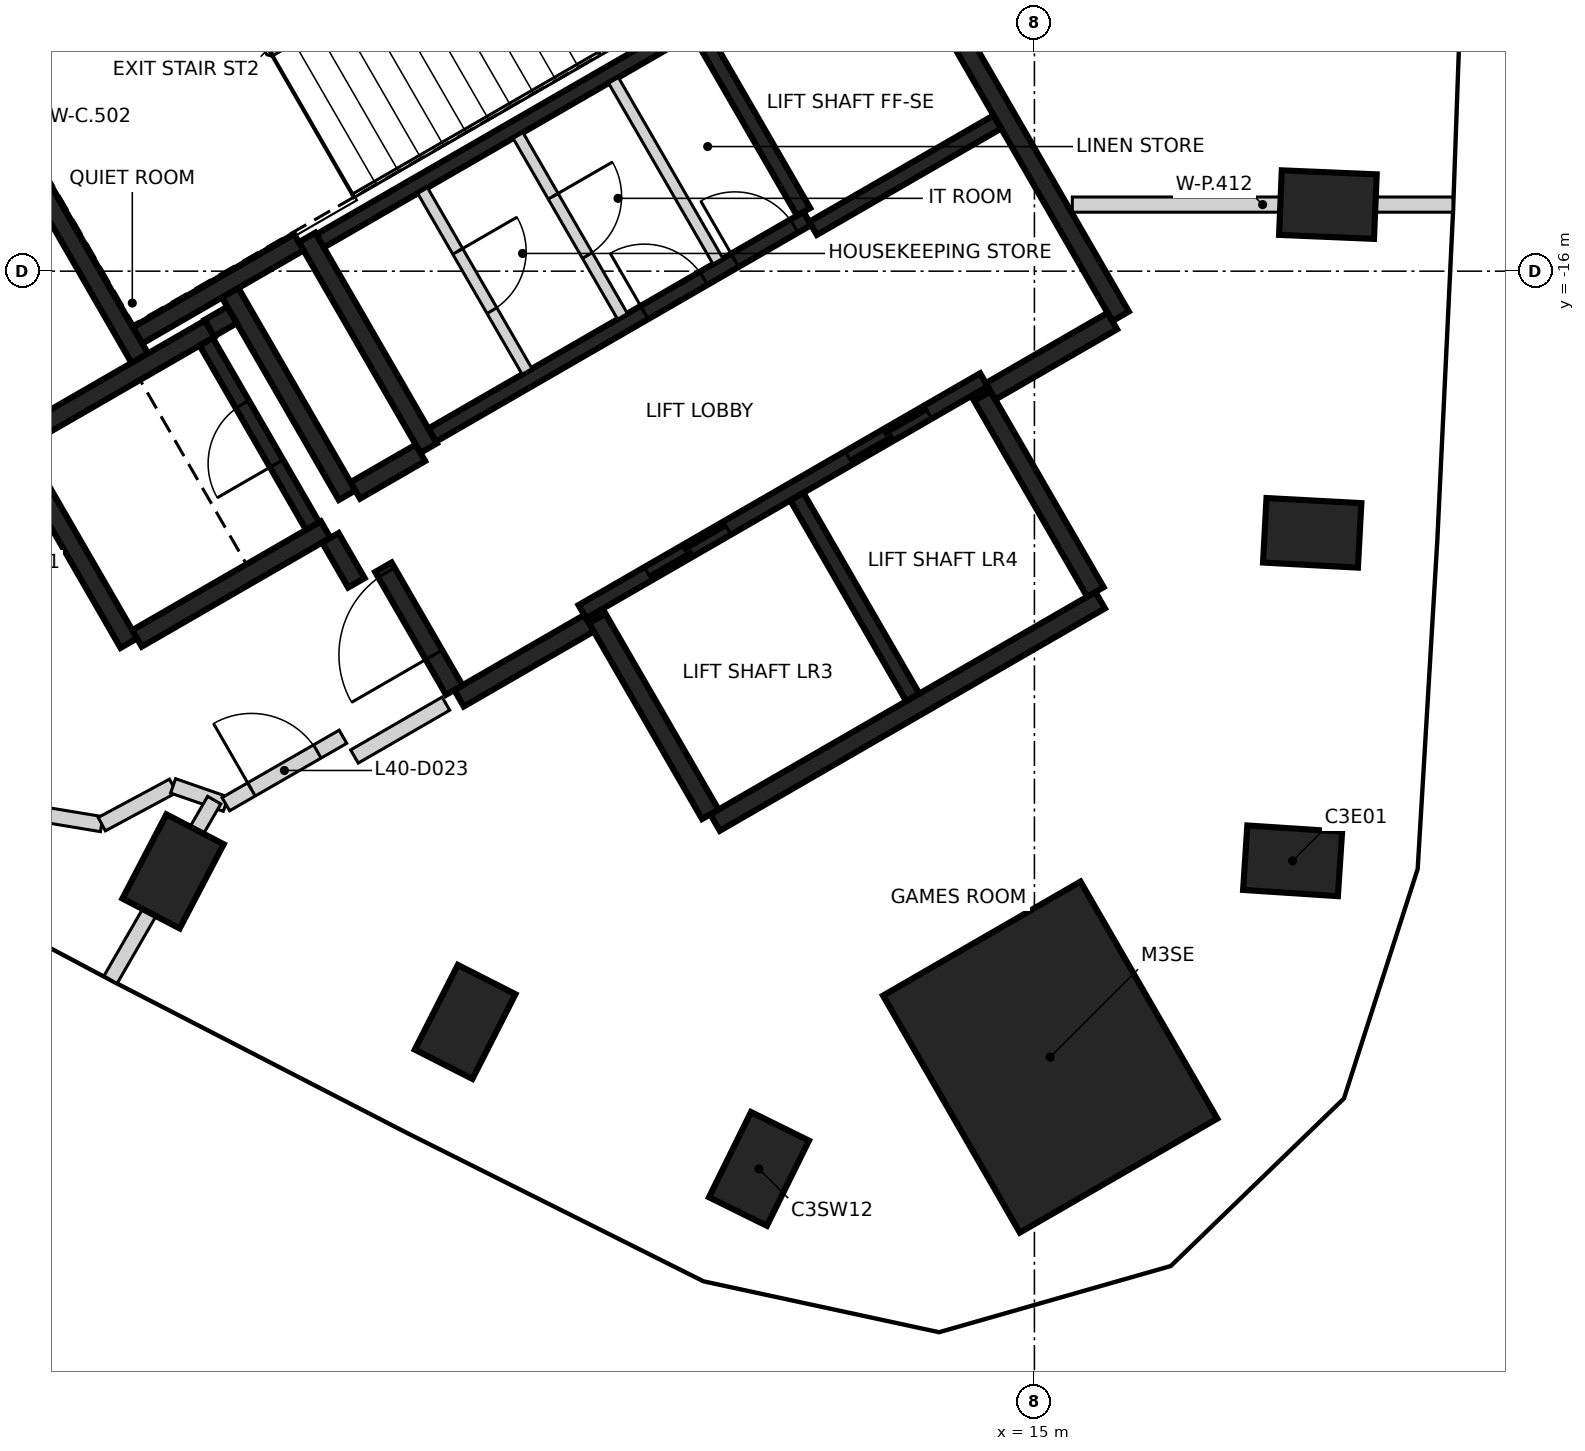
"""IFC4 building model, lengths in metres.
Left out: names, types, materials, properties, quantities, classifications, styles, units other than length and angle.
Written with IfcOpenShell. Run it as: python <this file> out.ifc"""

import sys

from ifc_helpers import new_model, si_unit, direction, frame, frame_2d, origin, origin_2d, place, context, subcontext, project, spatial, rectangle, extrude, element, fill, save


model = new_model("IFC4")
c1 = context("Model", 3, precision=1e-05, world=origin(), true_north=direction((0.0, 1.0)))
c2 = subcontext(c1, "Body", "Model", "MODEL_VIEW")
j1 = project(units=[si_unit("LENGTHUNIT", "METRE"), si_unit("PLANEANGLEUNIT", "RADIAN")], contexts=[c1])
p1 = place(None, origin())
s1 = spatial("IfcSite", under=j1, at=p1, CompositionType="ELEMENT")
p2 = place(p1, origin())
s2 = spatial("IfcBuilding", under=s1, at=p2, CompositionType="ELEMENT")
p3 = place(p2, frame((0.0, 0.0, 161.2)))
s3 = spatial("IfcBuildingStorey", under=s2, at=p3, CompositionType="ELEMENT", Elevation=161.2)
for number, where, z_axis, x_axis in (
    (1, (18.397, -23.757, -0.4), (0.0, 0.0, 1.0), (-0.998, 0.065, 0.0)),
    (2, (18.655, -19.442, -0.4), (0.0, 0.0, 1.0), (-0.999, 0.054, 0.0)),
    (3, (18.861, -15.124, -0.4), (0.0, 0.0, 1.0), (-0.999, 0.042, 0.0)),
    (4, (3.667, -23.896, -0.4), (0.0, 0.0, 1.0), (0.463, 0.886, 0.0)),
    (5, (7.51, -25.876, -0.4), (0.0, 0.0, 1.0), (0.453, 0.892, 0.0)),
    (6, (11.376, -27.811, -0.4), (0.0, 0.0, 1.0), (0.442, 0.897, 0.0)),
):
    element("IfcColumn", number, at=place(p3, frame(where, z_axis=z_axis, x_axis=x_axis)), inside=s3, PredefinedType="COLUMN", context=c2, shape_type="SweptSolid", body=[
        extrude(rectangle(XDim=1.25, YDim=0.85, at=origin_2d()), origin(), (0.0, 0.0, 1.0), 2.884),
    ])
p4 = place(p3, frame((15.207, -26.34, -0.4), z_axis=(0.0, 0.0, 1.0), x_axis=(-0.5, 0.866025403784, 0.0)))
e7 = element("IfcColumn", 7, at=p4, inside=s3, PredefinedType="COLUMN", context=c2, shape_type="SweptSolid", body=[
    extrude(rectangle(XDim=3.6, YDim=3.0, at=origin_2d()), origin(), (0.0, 0.0, 1.0), 3.6),
])
p5 = place(p3, frame((13.008, -11.181, 0.0), z_axis=(0.0, 0.0, 1.0), x_axis=(0.500004234368, -0.866022959057, 0.0)))
e8 = element("IfcWall", 8, at=p5, inside=s3, PredefinedType="SHEAR", context=c2, shape_type="SweptSolid", body=[
    extrude(rectangle(XDim=6.25, YDim=0.25, at=frame_2d((3.125, 0.0))), origin(), (0.0, 0.0, 1.0), 3.2),
])
p6 = place(p3, frame((15.865, -20.328, 0.0), z_axis=(0.0, 0.0, 1.0), x_axis=(-0.86602852612, -0.499994591916, 0.0)))
e9 = element("IfcWall", 9, at=p6, inside=s3, PredefinedType="SHEAR", context=c2, shape_type="SweptSolid", body=[
    extrude(rectangle(XDim=5.85, YDim=0.25, at=frame_2d((2.925, 0.0))), origin(), (0.0, 0.0, 1.0), 3.2),
])
p7 = place(p3, frame((3.235, -17.153, 0.0), z_axis=(0.0, 0.0, 1.0), x_axis=(-0.500008851346, 0.866020293397, 0.0)))
e10 = element("IfcWall", 10, at=p7, inside=s3, PredefinedType="SHEAR", context=c2, shape_type="SweptSolid", body=[
    extrude(rectangle(XDim=5.51, YDim=0.25, at=frame_2d((2.755, 0.0))), origin(), (0.0, 0.0, 1.0), 3.2),
])
p8 = place(p3, frame((7.031, -18.327, 0.0), z_axis=(0.0, 0.0, 1.0), x_axis=(-0.499971222258, 0.866042017984, 0.0)))
e11 = element("IfcWall", 11, at=p8, inside=s3, PredefinedType="SHEAR", context=c2, shape_type="SweptSolid", body=[
    extrude(rectangle(XDim=3.2, YDim=0.25, at=frame_2d((1.6, 0.0))), origin(), (0.0, 0.0, 1.0), 3.2),
])
for number, where, z_axis, x_axis in (
    (12, (14.315, -17.644, 0.0), (0.0, 0.0, 1.0), (0.5, -0.866, 0.0)),
    (13, (10.736, -23.145, 0.0), (0.0, 0.0, 1.0), (-0.5, 0.866, 0.0)),
):
    element("IfcWall", number, at=place(p3, frame(where, z_axis=z_axis, x_axis=x_axis)), inside=s3, PredefinedType="SHEAR", context=c2, shape_type="SweptSolid", body=[
        extrude(rectangle(XDim=2.974, YDim=0.25, at=frame_2d((1.487, 0.0))), origin(), (0.0, 0.0, 1.0), 3.2),
    ])
p9 = place(p3, frame((3.085, -20.894, 0.0), z_axis=(0.0, 0.0, 1.0), x_axis=(-0.499978833458, 0.866037623948, 0.0)))
e14 = element("IfcWall", 14, at=p9, inside=s3, PredefinedType="SHEAR", context=c2, shape_type="SweptSolid", body=[
    extrude(rectangle(XDim=3.05, YDim=0.25, at=frame_2d((1.525, 0.0))), origin(), (0.0, 0.0, 1.0), 3.2),
])
p10 = place(p3, frame((1.669, -18.19, 0.0), z_axis=(0.0, 0.0, 1.0), x_axis=(0.866042235819, 0.499970844928, 0.0)))
e15 = element("IfcWall", 15, at=p10, inside=s3, PredefinedType="SHEAR", context=c2, shape_type="SweptSolid", body=[
    extrude(rectangle(XDim=2.865, YDim=0.25, at=frame_2d((1.432, 0.0))), origin(), (0.0, 0.0, 1.0), 3.2),
])
p11 = place(p3, frame((5.675, -19.399, 0.0), z_axis=(0.0, 0.0, 1.0), x_axis=(-0.866026637627, -0.499997862916, 0.0)))
e16 = element("IfcWall", 16, at=p11, inside=s3, PredefinedType="SHEAR", context=c2, shape_type="SweptSolid", body=[
    extrude(rectangle(XDim=2.865, YDim=0.25, at=frame_2d((1.432, 0.0))), origin(), (0.0, 0.0, 1.0), 3.2),
])
p12 = place(p3, frame((4.414, -16.276, 0.0), z_axis=(0.0, 0.0, 1.0), x_axis=(0.500003324108, -0.866023484601, 0.0)))
e17 = element("IfcWall", 17, at=p12, inside=s3, PredefinedType="SHEAR", context=c2, shape_type="SweptSolid", body=[
    extrude(rectangle(XDim=3.085, YDim=0.25, at=frame_2d((1.542, 0.0))), origin(), (0.0, 0.0, 1.0), 3.2),
])
p13 = place(p3, frame((5.322, -15.619, 0.0), z_axis=(0.0, 0.0, 1.0), x_axis=(-0.866026229868, -0.499998569178, 0.0)))
e18 = element("IfcWall", 18, at=p13, inside=s3, PredefinedType="SHEAR", context=c2, shape_type="SweptSolid", body=[
    extrude(rectangle(XDim=2.449, YDim=0.25, at=frame_2d((1.225, 0.0))), origin(), (0.0, 0.0, 1.0), 3.2),
])
p14 = place(p3, frame((9.14, -20.631, 0.0), z_axis=(0.0, 0.0, 1.0), x_axis=(-0.866043531843, -0.499968599967, 0.0)))
e19 = element("IfcWall", 19, at=p14, inside=s3, PredefinedType="SHEAR", context=c2, shape_type="SweptSolid", body=[
    extrude(rectangle(XDim=1.975, YDim=0.25, at=frame_2d((0.987, 0.0))), origin(), (0.0, 0.0, 1.0), 3.2),
])
p15 = place(p3, frame((16.025, -16.656, 0.0), z_axis=(0.0, 0.0, 1.0), x_axis=(-0.866016279763, -0.500015802937, 0.0)))
e20 = element("IfcWall", 20, at=p15, inside=s3, PredefinedType="SHEAR", context=c2, shape_type="SweptSolid", body=[
    extrude(rectangle(XDim=1.849, YDim=0.25, at=frame_2d((0.925, 0.0))), origin(), (0.0, 0.0, 1.0), 3.2),
])
p16 = place(p3, frame((7.367, -21.51, 0.0), z_axis=(0.0, 0.0, 1.0), x_axis=(-0.499983108224, 0.866035156036, 0.0)))
e21 = element("IfcWall", 21, at=p16, inside=s3, PredefinedType="SHEAR", context=c2, shape_type="SweptSolid", body=[
    extrude(rectangle(XDim=1.865, YDim=0.25, at=frame_2d((0.932, 0.0))), origin(), (0.0, 0.0, 1.0), 3.2),
])
p17 = place(p16, frame((0.535, 0.0, 0.0)))
e22 = element("IfcOpeningElement", 22, at=p17, cuts=e21, PredefinedType="OPENING", context=c2, shape_type="SweptSolid", body=[
    extrude(rectangle(XDim=1.25, YDim=2.1, at=frame_2d((0.625, 1.05))), frame((0.0, 0.135, 0.0), z_axis=(0.0, -1.0, 0.0), x_axis=(1.0, 0.0, 0.0)), (0.0, 0.0, 1.0), 0.27),
])
p18 = place(p3, frame((6.065, -18.885, 0.0), z_axis=(0.0, 0.0, 1.0), x_axis=(0.866017078145, 0.500014420154, 0.0)))
e23 = element("IfcWall", 23, at=p18, inside=s3, PredefinedType="SHEAR", context=c2, shape_type="SweptSolid", body=[
    extrude(rectangle(XDim=0.989, YDim=0.25, at=frame_2d((0.495, 0.0))), origin(), (0.0, 0.0, 1.0), 3.2),
])
p19 = place(p3, frame((6.08, -20.1, 0.0), z_axis=(0.0, 0.0, 1.0), x_axis=(-0.500051773299, 0.865995510393, 0.0)))
e24 = element("IfcWall", 24, at=p19, inside=s3, PredefinedType="SHEAR", context=c2, shape_type="SweptSolid", body=[
    extrude(rectangle(XDim=0.685, YDim=0.25, at=frame_2d((0.342, 0.0))), origin(), (0.0, 0.0, 1.0), 3.2),
])
p20 = place(p3, frame((4.145, -16.749, 0.0), z_axis=(0.0, 0.0, 1.0), x_axis=(0.866185586049, 0.49972245349, 0.0)))
e25 = element("IfcWall", 25, at=p20, inside=s3, PredefinedType="SHEAR", context=c2, shape_type="SweptSolid", body=[
    extrude(rectangle(XDim=0.344, YDim=0.25, at=frame_2d((0.172, 0.0))), origin(), (0.0, 0.0, 1.0), 3.2),
])
p21 = place(p3, frame((9.052, -20.48, 0.0), z_axis=(0.0, 0.0, 1.0), x_axis=(0.866030299012, 0.499991521122, 0.0)))
e26 = element("IfcWall", 26, at=p21, inside=s3, PredefinedType="SHEAR", context=c2, shape_type="SweptSolid", body=[
    extrude(rectangle(XDim=6.1, YDim=0.2, at=frame_2d((3.05, 0.0))), origin(), (0.0, 0.0, 1.0), 3.2),
])
p22 = place(p21, frame((1.0, 0.0, 0.0)))
e27 = element("IfcOpeningElement", 27, at=p22, cuts=e26, PredefinedType="OPENING", context=c2, shape_type="SweptSolid", body=[
    extrude(rectangle(XDim=1.2, YDim=2.1, at=frame_2d((0.6, 1.05))), frame((0.0, 0.11, 0.0), z_axis=(0.0, -1.0, 0.0), x_axis=(1.0, 0.0, 0.0)), (0.0, 0.0, 1.0), 0.22),
])
p23 = place(p21, frame((4.05, 0.0, 0.0)))
e28 = element("IfcOpeningElement", 28, at=p23, cuts=e26, PredefinedType="OPENING", context=c2, shape_type="SweptSolid", body=[
    extrude(rectangle(XDim=1.2, YDim=2.1, at=frame_2d((0.6, 1.05))), frame((0.0, 0.11, 0.0), z_axis=(0.0, -1.0, 0.0), x_axis=(1.0, 0.0, 0.0)), (0.0, 0.0, 1.0), 0.22),
])
p24 = place(p3, frame((10.538, -12.752, 0.0), z_axis=(0.0, 0.0, 1.0), x_axis=(-0.866038630372, -0.499977090179, 0.0)))
e29 = element("IfcWall", 29, at=p24, inside=s3, PredefinedType="SHEAR", context=c2, shape_type="SweptSolid", body=[
    extrude(rectangle(XDim=5.699, YDim=0.2, at=frame_2d((2.85, 0.0))), origin(), (0.0, 0.0, 1.0), 3.2),
])
p25 = place(p3, frame((7.077, -18.156, 0.0), z_axis=(0.0, 0.0, 1.0), x_axis=(0.866038630372, 0.499977090179, 0.0)))
e30 = element("IfcWall", 30, at=p25, inside=s3, PredefinedType="SHEAR", context=c2, shape_type="SweptSolid", body=[
    extrude(rectangle(XDim=5.699, YDim=0.2, at=frame_2d((2.85, 0.0))), origin(), (0.0, 0.0, 1.0), 3.2),
])
p26 = place(p25, frame((3.224, 0.0, 0.0)))
e31 = element("IfcOpeningElement", 31, at=p26, cuts=e30, PredefinedType="OPENING", context=c2, shape_type="SweptSolid", body=[
    extrude(rectangle(XDim=0.9, YDim=2.1, at=frame_2d((0.45, 1.05))), frame((0.0, 0.11, 0.0), z_axis=(0.0, -1.0, 0.0), x_axis=(1.0, 0.0, 0.0)), (0.0, 0.0, 1.0), 0.22),
])
p27 = place(p25, frame((4.599, 0.0, 0.0)))
e32 = element("IfcOpeningElement", 32, at=p27, cuts=e30, PredefinedType="OPENING", context=c2, shape_type="SweptSolid", body=[
    extrude(rectangle(XDim=0.9, YDim=2.1, at=frame_2d((0.45, 1.05))), frame((0.0, 0.11, 0.0), z_axis=(0.0, -1.0, 0.0), x_axis=(1.0, 0.0, 0.0)), (0.0, 0.0, 1.0), 0.22),
])
p28 = place(p3, frame((11.875, -18.967, 0.0), z_axis=(0.0, 0.0, 1.0), x_axis=(0.49998131003, -0.866036194175, 0.0)))
e33 = element("IfcWall", 33, at=p28, inside=s3, PredefinedType="SHEAR", context=c2, shape_type="SweptSolid", body=[
    extrude(rectangle(XDim=3.048, YDim=0.2, at=frame_2d((1.524, 0.0))), origin(), (0.0, 0.0, 1.0), 3.2),
])
p29 = place(p3, frame((5.503, -19.352, 0.0), z_axis=(0.0, 0.0, 1.0), x_axis=(-0.499986818241, 0.866033014143, 0.0)))
e34 = element("IfcWall", 34, at=p29, inside=s3, PredefinedType="SHEAR", context=c2, shape_type="SweptSolid", body=[
    extrude(rectangle(XDim=2.798, YDim=0.2, at=frame_2d((1.399, 0.0))), origin(), (0.0, 0.0, 1.0), 3.2),
])
p30 = place(p29, frame((0.949, 0.0, 0.0)))
e35 = element("IfcOpeningElement", 35, at=p30, cuts=e34, PredefinedType="OPENING", context=c2, shape_type="SweptSolid", body=[
    extrude(rectangle(XDim=0.9, YDim=2.1, at=frame_2d((0.45, 1.05))), frame((0.0, 0.11, 0.0), z_axis=(0.0, -1.0, 0.0), x_axis=(1.0, 0.0, 0.0)), (0.0, 0.0, 1.0), 0.22),
])
p31 = place(p3, frame((11.963, -15.22, 0.0), z_axis=(0.0, 0.0, 1.0), x_axis=(-0.500034990121, 0.866005201286, 0.0)))
e36 = element("IfcWall", 36, at=p31, inside=s3, PredefinedType="SHEAR", context=c2, shape_type="SweptSolid", body=[
    extrude(rectangle(XDim=2.75, YDim=0.2, at=frame_2d((1.375, 0.0))), origin(), (0.0, 0.0, 1.0), 3.2),
])
p32 = place(p3, frame((14.512, -14.037, 0.0), z_axis=(0.0, 0.0, 1.0), x_axis=(-0.866044696403, -0.499966582715, 0.0)))
e37 = element("IfcWall", 37, at=p32, inside=s3, PredefinedType="SHEAR", context=c2, shape_type="SweptSolid", body=[
    extrude(rectangle(XDim=2.799, YDim=0.2, at=frame_2d((1.399, 0.0))), origin(), (0.0, 0.0, 1.0), 3.2),
])
p33 = place(p3, frame((8.207, -14.214, 0.0), z_axis=(0.0, 0.0, 1.0), x_axis=(0.50002746344, -0.86600954718, 0.0)))
e38 = element("IfcWall", 38, at=p33, inside=s3, PredefinedType="PARTITIONING", context=c2, shape_type="SweptSolid", body=[
    extrude(rectangle(XDim=2.748, YDim=0.15, at=frame_2d((1.374, 0.0))), origin(), (0.0, 0.0, 1.0), 3.2),
])
p34 = place(p33, frame((0.924, 0.0, 0.0)))
e39 = element("IfcOpeningElement", 39, at=p34, cuts=e38, PredefinedType="OPENING", context=c2, shape_type="SweptSolid", body=[
    extrude(rectangle(XDim=0.9, YDim=2.1, at=frame_2d((0.45, 1.05))), frame((0.0, 0.085, 0.0), z_axis=(0.0, -1.0, 0.0), x_axis=(1.0, 0.0, 0.0)), (0.0, 0.0, 1.0), 0.17),
])
p35 = place(p3, frame((9.462, -13.489, 0.0), z_axis=(0.0, 0.0, 1.0), x_axis=(0.499988999718, -0.866031754707, 0.0)))
e40 = element("IfcWall", 40, at=p35, inside=s3, PredefinedType="PARTITIONING", context=c2, shape_type="SweptSolid", body=[
    extrude(rectangle(XDim=2.749, YDim=0.15, at=frame_2d((1.374, 0.0))), origin(), (0.0, 0.0, 1.0), 3.2),
])
p36 = place(p3, frame((6.951, -14.939, 0.0), z_axis=(0.0, 0.0, 1.0), x_axis=(0.499988999718, -0.866031754707, 0.0)))
e41 = element("IfcWall", 41, at=p36, inside=s3, PredefinedType="PARTITIONING", context=c2, shape_type="SweptSolid", body=[
    extrude(rectangle(XDim=2.749, YDim=0.15, at=frame_2d((1.374, 0.0))), origin(), (0.0, 0.0, 1.0), 3.2),
])
p37 = place(p36, frame((0.924, 0.0, 0.0)))
e42 = element("IfcOpeningElement", 42, at=p37, cuts=e41, PredefinedType="OPENING", context=c2, shape_type="SweptSolid", body=[
    extrude(rectangle(XDim=0.9, YDim=2.1, at=frame_2d((0.45, 1.05))), frame((0.0, 0.085, 0.0), z_axis=(0.0, -1.0, 0.0), x_axis=(1.0, 0.0, 0.0)), (0.0, 0.0, 1.0), 0.17),
])
p38 = place(p3, frame((1.584, -23.086, 0.0), z_axis=(0.0, 0.0, 1.0), x_axis=(0.986654221629, -0.162829502674, 0.0)))
e43 = element("IfcWall", 43, at=p38, inside=s3, PredefinedType="PARTITIONING", context=c2, shape_type="SweptSolid", body=[
    extrude(rectangle(XDim=1.16, YDim=0.2, at=frame_2d((0.58, 0.0))), origin(), (0.0, 0.0, 1.0), 2.484),
])
p39 = place(p3, frame((2.73, -23.275, 0.0), z_axis=(0.0, 0.0, 1.0), x_axis=(0.880927165636, 0.473251866182, 0.0)))
e44 = element("IfcWall", 44, at=p39, inside=s3, PredefinedType="PARTITIONING", context=c2, shape_type="SweptSolid", body=[
    extrude(rectangle(XDim=1.065, YDim=0.2, at=frame_2d((0.532, 0.0))), origin(), (0.0, 0.0, 1.0), 3.2),
])
p40 = place(p3, frame((3.668, -22.771, 0.0), z_axis=(0.0, 0.0, 1.0), x_axis=(0.944447470761, -0.328662402738, 0.0)))
e45 = element("IfcWall", 45, at=p40, inside=s3, PredefinedType="PARTITIONING", context=c2, shape_type="SweptSolid", body=[
    extrude(rectangle(XDim=0.735, YDim=0.2, at=frame_2d((0.367, 0.0))), origin(), (0.0, 0.0, 1.0), 3.2),
])
p41 = place(p3, frame((4.362, -23.012, 0.0), z_axis=(0.0, 0.0, 1.0), x_axis=(0.866692617793, 0.49884256661, 0.0)))
e46 = element("IfcWall", 46, at=p41, inside=s3, PredefinedType="PARTITIONING", context=c2, shape_type="SweptSolid", body=[
    extrude(rectangle(XDim=1.778, YDim=0.2, at=frame_2d((0.889, 0.0))), origin(), (0.0, 0.0, 1.0), 3.2),
])
p42 = place(p41, frame((0.389, 0.0, 0.0)))
e47 = element("IfcOpeningElement", 47, at=p42, cuts=e46, PredefinedType="OPENING", context=c2, shape_type="SweptSolid", body=[
    extrude(rectangle(XDim=1.0, YDim=2.1, at=frame_2d((0.5, 1.05))), frame((0.0, 0.11, 0.0), z_axis=(0.0, -1.0, 0.0), x_axis=(1.0, 0.0, 0.0)), (0.0, 0.0, 1.0), 0.22),
])
p43 = place(p3, frame((6.054, -22.385, 0.0), z_axis=(0.0, 0.0, 1.0), x_axis=(0.86593101922, 0.500163443238, 0.0)))
e48 = element("IfcWall", 48, at=p43, inside=s3, PredefinedType="PARTITIONING", context=c2, shape_type="SweptSolid", body=[
    extrude(rectangle(XDim=1.39, YDim=0.2, at=frame_2d((0.695, 0.0))), origin(), (0.0, 0.0, 1.0), 3.2),
])
p44 = place(p3, frame((2.845, -25.321, 0.0), z_axis=(0.0, 0.0, 1.0), x_axis=(0.499942002849, 0.866058885866, 0.0)))
e49 = element("IfcWall", 49, at=p44, inside=s3, PredefinedType="PARTITIONING", context=c2, shape_type="SweptSolid", body=[
    extrude(rectangle(XDim=2.727, YDim=0.2, at=frame_2d((1.364, 0.0))), origin(), (0.0, 0.0, 1.0), 3.2),
])
p45 = place(p3, frame((15.498, -15.124, 0.0), z_axis=(0.0, 0.0, 1.0), x_axis=(1.0, 0.0, 0.0)))
e50 = element("IfcWall", 50, at=p45, inside=s3, PredefinedType="PARTITIONING", context=c2, shape_type="SweptSolid", body=[
    extrude(rectangle(XDim=5.008, YDim=0.2, at=frame_2d((2.504, 0.0))), origin(), (0.0, 0.0, 1.0), 3.2),
])
p46 = place(p22, origin())
e51 = element("IfcDoor", 51, at=p46, inside=s3, OperationType="DOUBLE_DOOR_SLIDING", PredefinedType="DOOR", context=c2, shape_type="SweptSolid", body=[
    extrude(rectangle(XDim=1.2, YDim=2.1, at=frame_2d((0.6, 1.05))), frame((0.0, 0.025, 0.0), z_axis=(0.0, -1.0, 0.0), x_axis=(1.0, 0.0, 0.0)), (0.0, 0.0, 1.0), 0.05),
])
fill(e27, e51)
p47 = place(p23, origin())
e52 = element("IfcDoor", 52, at=p47, inside=s3, OperationType="DOUBLE_DOOR_SLIDING", PredefinedType="DOOR", context=c2, shape_type="SweptSolid", body=[
    extrude(rectangle(XDim=1.2, YDim=2.1, at=frame_2d((0.6, 1.05))), frame((0.0, 0.025, 0.0), z_axis=(0.0, -1.0, 0.0), x_axis=(1.0, 0.0, 0.0)), (0.0, 0.0, 1.0), 0.05),
])
fill(e28, e52)
p48 = place(p17, origin())
e53 = element("IfcDoor", 53, at=p48, inside=s3, OperationType="SINGLE_SWING_LEFT", PredefinedType="DOOR", context=c2, shape_type="SweptSolid", body=[
    extrude(rectangle(XDim=1.25, YDim=2.1, at=frame_2d((0.625, 1.05))), frame((0.0, 0.025, 0.0), z_axis=(0.0, -1.0, 0.0), x_axis=(1.0, 0.0, 0.0)), (0.0, 0.0, 1.0), 0.05),
])
fill(e22, e53)
p49 = place(p26, origin())
e54 = element("IfcDoor", 54, at=p49, inside=s3, OperationType="SINGLE_SWING_LEFT", PredefinedType="DOOR", context=c2, shape_type="SweptSolid", body=[
    extrude(rectangle(XDim=0.9, YDim=2.1, at=frame_2d((0.45, 1.05))), frame((0.0, 0.025, 0.0), z_axis=(0.0, -1.0, 0.0), x_axis=(1.0, 0.0, 0.0)), (0.0, 0.0, 1.0), 0.05),
])
fill(e31, e54)
p50 = place(p27, origin())
e55 = element("IfcDoor", 55, at=p50, inside=s3, OperationType="SINGLE_SWING_RIGHT", PredefinedType="DOOR", context=c2, shape_type="SweptSolid", body=[
    extrude(rectangle(XDim=0.9, YDim=2.1, at=frame_2d((0.45, 1.05))), frame((0.0, 0.025, 0.0), z_axis=(0.0, -1.0, 0.0), x_axis=(1.0, 0.0, 0.0)), (0.0, 0.0, 1.0), 0.05),
])
fill(e32, e55)
p51 = place(p30, origin())
e56 = element("IfcDoor", 56, at=p51, inside=s3, OperationType="SINGLE_SWING_LEFT", PredefinedType="DOOR", context=c2, shape_type="SweptSolid", body=[
    extrude(rectangle(XDim=0.9, YDim=2.1, at=frame_2d((0.45, 1.05))), frame((0.0, 0.025, 0.0), z_axis=(0.0, -1.0, 0.0), x_axis=(1.0, 0.0, 0.0)), (0.0, 0.0, 1.0), 0.05),
])
fill(e35, e56)
p52 = place(p34, origin())
e57 = element("IfcDoor", 57, at=p52, inside=s3, OperationType="SINGLE_SWING_RIGHT", PredefinedType="DOOR", context=c2, shape_type="SweptSolid", body=[
    extrude(rectangle(XDim=0.9, YDim=2.1, at=frame_2d((0.45, 1.05))), frame((0.0, 0.025, 0.0), z_axis=(0.0, -1.0, 0.0), x_axis=(1.0, 0.0, 0.0)), (0.0, 0.0, 1.0), 0.05),
])
fill(e39, e57)
p53 = place(p37, origin())
e58 = element("IfcDoor", 58, at=p53, inside=s3, OperationType="SINGLE_SWING_LEFT", PredefinedType="DOOR", context=c2, shape_type="SweptSolid", body=[
    extrude(rectangle(XDim=0.9, YDim=2.1, at=frame_2d((0.45, 1.05))), frame((0.0, 0.025, 0.0), z_axis=(0.0, -1.0, 0.0), x_axis=(1.0, 0.0, 0.0)), (0.0, 0.0, 1.0), 0.05),
])
fill(e42, e58)
p54 = place(p42, frame((1.0, 0.0, 0.0), z_axis=(0.0, 0.0, 1.0), x_axis=(-1.0, 0.0, 0.0)))
e59 = element("IfcDoor", 59, at=p54, inside=s3, OperationType="SINGLE_SWING_LEFT", PredefinedType="DOOR", context=c2, shape_type="SweptSolid", body=[
    extrude(rectangle(XDim=1.0, YDim=2.1, at=frame_2d((0.5, 1.05))), frame((0.0, 0.025, 0.0), z_axis=(0.0, -1.0, 0.0), x_axis=(1.0, 0.0, 0.0)), (0.0, 0.0, 1.0), 0.05),
])
fill(e47, e59)
save(model, sys.argv[1])
